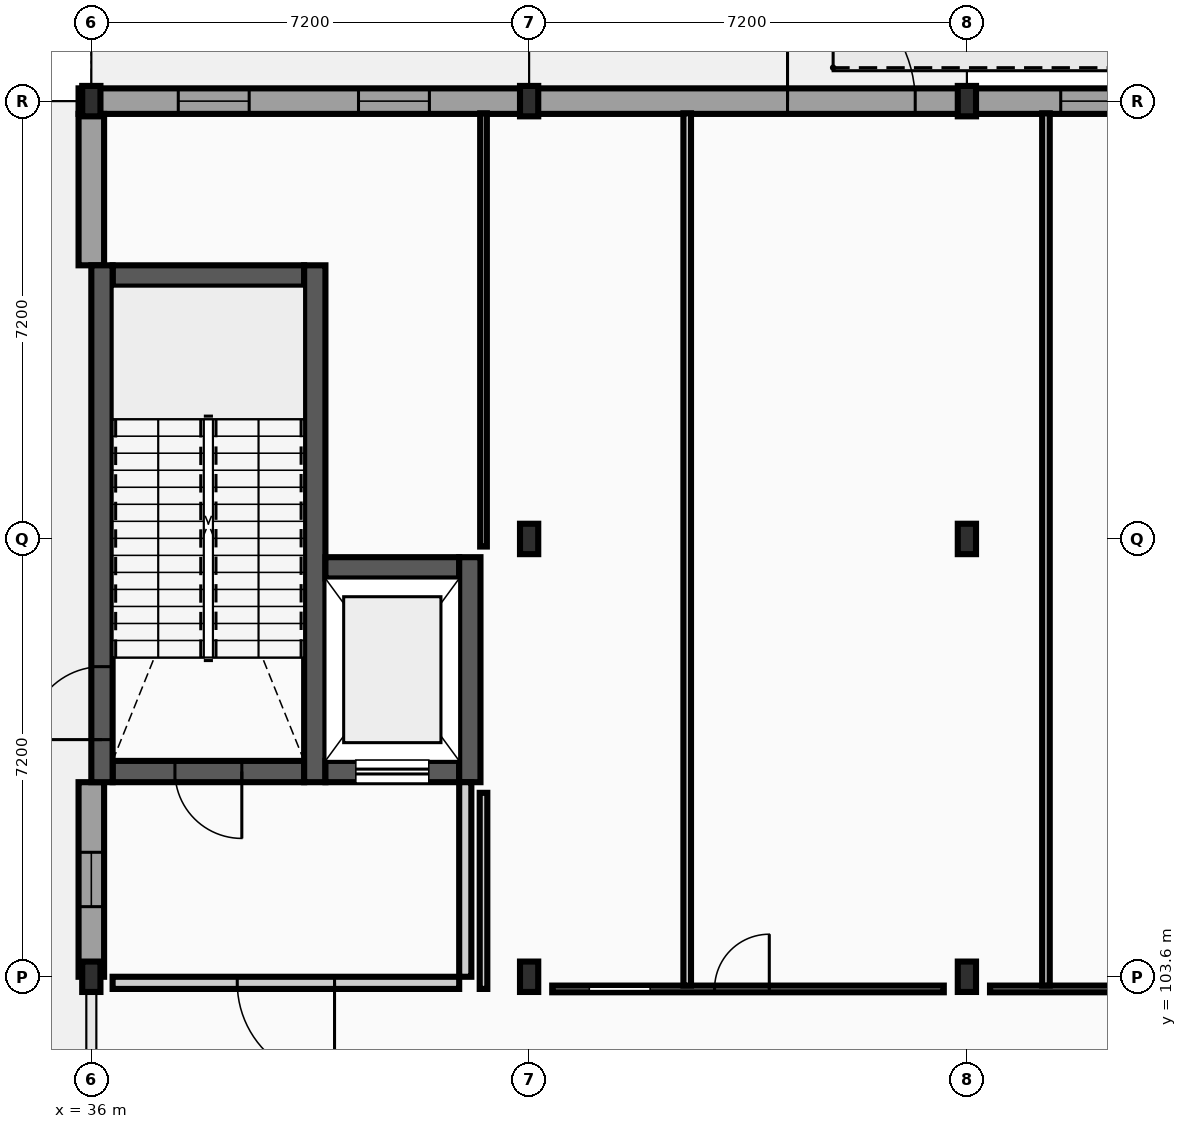
"""IFC4 building model, lengths in metres.
Left out: names, types, materials, properties, quantities, classifications, styles, units other than length and angle.
Written with IfcOpenShell. Run it as: python <this file> out.ifc"""

import sys

from ifc_helpers import new_model, si_unit, direction, frame, frame_2d, origin, origin_2d, place, context, subcontext, project, spatial, rectangle, i_section, extrude, element, fill, save


model = new_model("IFC4")
c1 = context("Model", 3, precision=1e-05, world=origin(), true_north=direction((0.0, 1.0)))
c2 = subcontext(c1, "Body", "Model", "MODEL_VIEW")
j1 = project(units=[si_unit("LENGTHUNIT", "METRE"), si_unit("PLANEANGLEUNIT", "RADIAN")], contexts=[c1])
p1 = place(None, origin())
s1 = spatial("IfcSite", under=j1, at=p1, CompositionType="ELEMENT")
p2 = place(p1, origin())
s2 = spatial("IfcBuilding", under=s1, at=p2, CompositionType="ELEMENT")
p3 = place(p2, origin())
s3 = spatial("IfcBuildingStorey", under=s2, at=p3, CompositionType="ELEMENT", Elevation=0.0)
for number, where, z_axis, x_axis in (
    (1, (36.0, 103.6, 0.0), (0.0, 0.0, 1.0), (1.0, 0.0, 0.0)),
    (2, (36.0, 118.0, 0.0), (0.0, 0.0, 1.0), (1.0, 0.0, 0.0)),
    (3, (43.2, 103.6, 0.0), (0.0, 0.0, 1.0), (1.0, 0.0, 0.0)),
    (4, (43.2, 110.8, 0.0), (0.0, 0.0, 1.0), (1.0, 0.0, 0.0)),
    (5, (43.2, 118.0, 0.0), (0.0, 0.0, 1.0), (1.0, 0.0, 0.0)),
    (6, (50.4, 103.6, 0.0), (0.0, 0.0, 1.0), (1.0, 0.0, 0.0)),
    (7, (50.4, 110.8, 0.0), (0.0, 0.0, 1.0), (1.0, 0.0, 0.0)),
    (8, (50.4, 118.0, 0.0), (0.0, 0.0, 1.0), (1.0, 0.0, 0.0)),
):
    element("IfcColumn", number, at=place(p3, frame(where, z_axis=z_axis, x_axis=x_axis)), inside=s3, PredefinedType="COLUMN", context=c2, shape_type="SweptSolid", body=[
        extrude(i_section(OverallWidth=0.3, OverallDepth=0.5, WebThickness=0.014, FlangeThickness=0.028, FilletRadius=0.027, at=origin_2d()), origin(), (0.0, 0.0, 1.0), 5.2),
    ])
p4 = place(p3, frame((43.2, 118.0, 0.0), z_axis=(0.0, 0.0, 1.0), x_axis=(-1.0, 0.0, 0.0)))
e9 = element("IfcWall", 9, at=p4, inside=s3, PredefinedType="STANDARD", context=c2, shape_type="SweptSolid", body=[
    extrude(rectangle(XDim=7.41, YDim=0.42, at=frame_2d((3.705, 0.0))), origin(), (0.0, 0.0, 1.0), 4.665),
])
p5 = place(p4, frame((1.64, 0.0, 0.95)))
e10 = element("IfcOpeningElement", 10, at=p5, cuts=e9, PredefinedType="OPENING", context=c2, shape_type="SweptSolid", body=[
    extrude(rectangle(XDim=1.166, YDim=1.332, at=frame_2d((0.583, 0.666))), frame((0.0, 0.22, 0.0), z_axis=(0.0, -1.0, 0.0), x_axis=(1.0, 0.0, 0.0)), (0.0, 0.0, 1.0), 0.44),
])
p6 = place(p4, frame((4.604, 0.0, 0.95)))
e11 = element("IfcOpeningElement", 11, at=p6, cuts=e9, PredefinedType="OPENING", context=c2, shape_type="SweptSolid", body=[
    extrude(rectangle(XDim=1.166, YDim=1.332, at=frame_2d((0.583, 0.666))), frame((0.0, 0.22, 0.0), z_axis=(0.0, -1.0, 0.0), x_axis=(1.0, 0.0, 0.0)), (0.0, 0.0, 1.0), 0.44),
])
p7 = place(p3, frame((50.4, 118.0, 0.0), z_axis=(0.0, 0.0, 1.0), x_axis=(-1.0, 0.0, 0.0)))
e12 = element("IfcWall", 12, at=p7, inside=s3, PredefinedType="STANDARD", context=c2, shape_type="SweptSolid", body=[
    extrude(rectangle(XDim=7.2, YDim=0.42, at=frame_2d((3.6, 0.0))), origin(), (0.0, 0.0, 1.0), 4.665),
])
p8 = place(p7, frame((0.85, 0.0, 0.0)))
e13 = element("IfcOpeningElement", 13, at=p8, cuts=e12, PredefinedType="OPENING", context=c2, shape_type="SweptSolid", body=[
    extrude(rectangle(XDim=2.1, YDim=2.4, at=frame_2d((1.05, 1.2))), frame((0.0, 0.22, 0.0), z_axis=(0.0, -1.0, 0.0), x_axis=(1.0, 0.0, 0.0)), (0.0, 0.0, 1.0), 0.44),
])
p9 = place(p3, frame((57.6, 118.0, 0.0), z_axis=(0.0, 0.0, 1.0), x_axis=(-1.0, 0.0, 0.0)))
e14 = element("IfcWall", 14, at=p9, inside=s3, PredefinedType="STANDARD", context=c2, shape_type="SweptSolid", body=[
    extrude(rectangle(XDim=7.2, YDim=0.42, at=frame_2d((3.6, 0.0))), origin(), (0.0, 0.0, 1.0), 4.665),
])
p10 = place(p9, frame((1.543, 0.0, 0.95)))
e15 = element("IfcOpeningElement", 15, at=p10, cuts=e14, PredefinedType="OPENING", context=c2, shape_type="SweptSolid", body=[
    extrude(rectangle(XDim=1.234, YDim=1.332, at=frame_2d((0.617, 0.666))), frame((0.0, 0.22, 0.0), z_axis=(0.0, -1.0, 0.0), x_axis=(1.0, 0.0, 0.0)), (0.0, 0.0, 1.0), 0.44),
])
p11 = place(p9, frame((4.423, 0.0, 0.95)))
e16 = element("IfcOpeningElement", 16, at=p11, cuts=e14, PredefinedType="OPENING", context=c2, shape_type="SweptSolid", body=[
    extrude(rectangle(XDim=1.234, YDim=1.332, at=frame_2d((0.617, 0.666))), frame((0.0, 0.22, 0.0), z_axis=(0.0, -1.0, 0.0), x_axis=(1.0, 0.0, 0.0)), (0.0, 0.0, 1.0), 0.44),
])
p12 = place(p3, frame((36.0, 106.8, 0.0), z_axis=(0.0, 0.0, 1.0), x_axis=(0.0, -1.0, 0.0)))
e17 = element("IfcWall", 17, at=p12, inside=s3, PredefinedType="STANDARD", context=c2, shape_type="SweptSolid", body=[
    extrude(rectangle(XDim=3.2, YDim=0.42, at=frame_2d((1.6, 0.0))), origin(), (0.0, 0.0, 1.0), 4.97),
])
p13 = place(p12, frame((1.153, 0.0, 0.95)))
e18 = element("IfcOpeningElement", 18, at=p13, cuts=e17, PredefinedType="OPENING", context=c2, shape_type="SweptSolid", body=[
    extrude(rectangle(XDim=0.894, YDim=1.368, at=frame_2d((0.447, 0.684))), frame((0.0, 0.22, 0.0), z_axis=(0.0, -1.0, 0.0), x_axis=(1.0, 0.0, 0.0)), (0.0, 0.0, 1.0), 0.44),
])
p14 = place(p3, frame((36.0, 117.79, 0.0), z_axis=(0.0, 0.0, 1.0), x_axis=(0.0, -1.0, 0.0)))
e19 = element("IfcWall", 19, at=p14, inside=s3, PredefinedType="STANDARD", context=c2, shape_type="SweptSolid", body=[
    extrude(rectangle(XDim=2.49, YDim=0.42, at=frame_2d((1.245, 0.0))), origin(), (0.0, 0.0, 1.0), 4.97),
])
p15 = place(p3, frame((36.35, 106.975, 0.0), z_axis=(0.0, 0.0, 1.0), x_axis=(1.0, 0.0, 0.0)))
e20 = element("IfcWall", 20, at=p15, inside=s3, PredefinedType="SHEAR", context=c2, shape_type="SweptSolid", body=[
    extrude(rectangle(XDim=3.15, YDim=0.35, at=frame_2d((1.575, 0.0))), origin(), (0.0, 0.0, 1.0), 4.97),
])
p16 = place(p15, frame((1.025, 0.0, 0.0)))
e21 = element("IfcOpeningElement", 21, at=p16, cuts=e20, PredefinedType="OPENING", context=c2, shape_type="SweptSolid", body=[
    extrude(rectangle(XDim=1.1, YDim=2.15, at=frame_2d((0.55, 1.075))), frame((0.0, 0.185, 0.0), z_axis=(0.0, -1.0, 0.0), x_axis=(1.0, 0.0, 0.0)), (0.0, 0.0, 1.0), 0.37),
])
p17 = place(p3, frame((36.35, 115.125, 0.0), z_axis=(0.0, 0.0, 1.0), x_axis=(1.0, 0.0, 0.0)))
e22 = element("IfcWall", 22, at=p17, inside=s3, PredefinedType="SHEAR", context=c2, shape_type="SweptSolid", body=[
    extrude(rectangle(XDim=3.15, YDim=0.35, at=frame_2d((1.575, 0.0))), origin(), (0.0, 0.0, 1.0), 4.97),
])
p18 = place(p3, frame((36.175, 106.8, 0.0), z_axis=(0.0, 0.0, 1.0), x_axis=(0.0, 1.0, 0.0)))
e23 = element("IfcWall", 23, at=p18, inside=s3, PredefinedType="SHEAR", context=c2, shape_type="SweptSolid", body=[
    extrude(rectangle(XDim=8.5, YDim=0.35, at=frame_2d((4.25, 0.0))), origin(), (0.0, 0.0, 1.0), 4.97),
])
p19 = place(p18, frame((0.7, 0.0, 0.0)))
e24 = element("IfcOpeningElement", 24, at=p19, cuts=e23, PredefinedType="OPENING", context=c2, shape_type="SweptSolid", body=[
    extrude(rectangle(XDim=1.2, YDim=2.15, at=frame_2d((0.6, 1.075))), frame((0.0, 0.185, 0.0), z_axis=(0.0, -1.0, 0.0), x_axis=(1.0, 0.0, 0.0)), (0.0, 0.0, 1.0), 0.37),
])
p20 = place(p3, frame((39.675, 106.8, 0.0), z_axis=(0.0, 0.0, 1.0), x_axis=(0.0, 1.0, 0.0)))
e25 = element("IfcWall", 25, at=p20, inside=s3, PredefinedType="SHEAR", context=c2, shape_type="SweptSolid", body=[
    extrude(rectangle(XDim=8.5, YDim=0.35, at=frame_2d((4.25, 0.0))), origin(), (0.0, 0.0, 1.0), 4.97),
])
p21 = place(p3, frame((39.85, 106.975, 0.0), z_axis=(0.0, 0.0, 1.0), x_axis=(1.0, 0.0, 0.0)))
e26 = element("IfcWall", 26, at=p21, inside=s3, PredefinedType="SHEAR", context=c2, shape_type="SweptSolid", body=[
    extrude(rectangle(XDim=2.2, YDim=0.35, at=frame_2d((1.1, 0.0))), origin(), (0.0, 0.0, 1.0), 4.97),
])
p22 = place(p21, frame((0.5, 0.0, 0.0)))
e27 = element("IfcOpeningElement", 27, at=p22, cuts=e26, PredefinedType="OPENING", context=c2, shape_type="SweptSolid", body=[
    extrude(rectangle(XDim=1.2, YDim=2.2, at=frame_2d((0.6, 1.1))), frame((0.0, 0.185, 0.0), z_axis=(0.0, -1.0, 0.0), x_axis=(1.0, 0.0, 0.0)), (0.0, 0.0, 1.0), 0.37),
])
p23 = place(p3, frame((39.85, 110.325, 0.0), z_axis=(0.0, 0.0, 1.0), x_axis=(1.0, 0.0, 0.0)))
e28 = element("IfcWall", 28, at=p23, inside=s3, PredefinedType="SHEAR", context=c2, shape_type="SweptSolid", body=[
    extrude(rectangle(XDim=2.2, YDim=0.35, at=frame_2d((1.1, 0.0))), origin(), (0.0, 0.0, 1.0), 4.97),
])
p24 = place(p3, frame((42.225, 106.8, 0.0), z_axis=(0.0, 0.0, 1.0), x_axis=(0.0, 1.0, 0.0)))
e29 = element("IfcWall", 29, at=p24, inside=s3, PredefinedType="SHEAR", context=c2, shape_type="SweptSolid", body=[
    extrude(rectangle(XDim=3.7, YDim=0.35, at=frame_2d((1.85, 0.0))), origin(), (0.0, 0.0, 1.0), 4.97),
])
p25 = place(p3, frame((36.35, 103.5, 0.0), z_axis=(0.0, 0.0, 1.0), x_axis=(1.0, 0.0, 0.0)))
e30 = element("IfcWall", 30, at=p25, inside=s3, PredefinedType="PARTITIONING", context=c2, shape_type="SweptSolid", body=[
    extrude(rectangle(XDim=5.7, YDim=0.2, at=frame_2d((2.85, 0.0))), origin(), (0.0, 0.0, 1.0), 4.665),
])
p26 = place(p25, frame((2.05, 0.0, 0.0)))
e31 = element("IfcOpeningElement", 31, at=p26, cuts=e30, PredefinedType="OPENING", context=c2, shape_type="SweptSolid", body=[
    extrude(rectangle(XDim=1.6, YDim=2.2, at=frame_2d((0.8, 1.1))), frame((0.0, 0.11, 0.0), z_axis=(0.0, -1.0, 0.0), x_axis=(1.0, 0.0, 0.0)), (0.0, 0.0, 1.0), 0.22),
])
p27 = place(p3, frame((42.15, 103.6, 0.0), z_axis=(0.0, 0.0, 1.0), x_axis=(0.0, 1.0, 0.0)))
e32 = element("IfcWall", 32, at=p27, inside=s3, PredefinedType="PARTITIONING", context=c2, shape_type="SweptSolid", body=[
    extrude(rectangle(XDim=3.2, YDim=0.2, at=frame_2d((1.6, 0.0))), origin(), (0.0, 0.0, 1.0), 4.97),
])
p28 = place(p3, frame((43.58, 103.4, 0.0), z_axis=(0.0, 0.0, 1.0), x_axis=(1.0, 0.0, 0.0)))
e33 = element("IfcWall", 33, at=p28, inside=s3, PredefinedType="PARTITIONING", context=c2, shape_type="SweptSolid", body=[
    extrude(rectangle(XDim=6.44, YDim=0.11, at=frame_2d((3.22, 0.0))), origin(), (0.0, 0.0, 1.0), 4.665),
])
p29 = place(p28, frame((0.61, 0.0, 0.0)))
e34 = element("IfcOpeningElement", 34, at=p29, cuts=e33, PredefinedType="OPENING", context=c2, shape_type="SweptSolid", body=[
    extrude(rectangle(XDim=1.0, YDim=2.1, at=frame_2d((0.5, 1.05))), frame((0.0, 0.065, 0.0), z_axis=(0.0, -1.0, 0.0), x_axis=(1.0, 0.0, 0.0)), (0.0, 0.0, 1.0), 0.13),
])
p30 = place(p28, frame((2.67, 0.0, 0.0)))
e35 = element("IfcOpeningElement", 35, at=p30, cuts=e33, PredefinedType="OPENING", context=c2, shape_type="SweptSolid", body=[
    extrude(rectangle(XDim=0.9, YDim=2.1, at=frame_2d((0.45, 1.05))), frame((0.0, 0.065, 0.0), z_axis=(0.0, -1.0, 0.0), x_axis=(1.0, 0.0, 0.0)), (0.0, 0.0, 1.0), 0.13),
])
p31 = place(p3, frame((50.78, 103.4, 0.0), z_axis=(0.0, 0.0, 1.0), x_axis=(1.0, 0.0, 0.0)))
e36 = element("IfcWall", 36, at=p31, inside=s3, PredefinedType="PARTITIONING", context=c2, shape_type="SweptSolid", body=[
    extrude(rectangle(XDim=6.44, YDim=0.11, at=frame_2d((3.22, 0.0))), origin(), (0.0, 0.0, 1.0), 4.665),
])
p32 = place(p31, frame((3.123, 0.0, 0.0)))
e37 = element("IfcOpeningElement", 37, at=p32, cuts=e36, PredefinedType="OPENING", context=c2, shape_type="SweptSolid", body=[
    extrude(rectangle(XDim=1.114, YDim=2.096, at=frame_2d((0.557, 1.048))), frame((0.0, 0.065, 0.0), z_axis=(0.0, -1.0, 0.0), x_axis=(1.0, 0.0, 0.0)), (0.0, 0.0, 1.0), 0.13),
])
p33 = place(p3, frame((42.45, 103.4, 0.0), z_axis=(0.0, 0.0, 1.0), x_axis=(0.0, 1.0, 0.0)))
e38 = element("IfcWall", 38, at=p33, inside=s3, PredefinedType="PARTITIONING", context=c2, shape_type="SweptSolid", body=[
    extrude(rectangle(XDim=3.225, YDim=0.125, at=frame_2d((1.613, 0.0))), origin(), (0.0, 0.0, 1.0), 4.97),
])
p34 = place(p3, frame((42.45, 110.675, 0.0), z_axis=(0.0, 0.0, 1.0), x_axis=(0.0, 1.0, 0.0)))
e39 = element("IfcWall", 39, at=p34, inside=s3, PredefinedType="PARTITIONING", context=c2, shape_type="SweptSolid", body=[
    extrude(rectangle(XDim=7.125, YDim=0.11, at=frame_2d((3.562, 0.0))), origin(), (0.0, 0.0, 1.0), 4.97),
])
p35 = place(p3, frame((45.8, 103.455, 0.0), z_axis=(0.0, 0.0, 1.0), x_axis=(0.0, 1.0, 0.0)))
e40 = element("IfcWall", 40, at=p35, inside=s3, PredefinedType="PARTITIONING", context=c2, shape_type="SweptSolid", body=[
    extrude(rectangle(XDim=14.345, YDim=0.125, at=frame_2d((7.172, 0.0))), origin(), (0.0, 0.0, 1.0), 4.655),
])
p36 = place(p3, frame((51.7, 103.455, 0.0), z_axis=(0.0, 0.0, 1.0), x_axis=(0.0, 1.0, 0.0)))
e41 = element("IfcWall", 41, at=p36, inside=s3, PredefinedType="PARTITIONING", context=c2, shape_type="SweptSolid", body=[
    extrude(rectangle(XDim=14.345, YDim=0.125, at=frame_2d((7.172, 0.0))), origin(), (0.0, 0.0, 1.0), 4.97),
])
p37 = place(p5, origin())
e42 = element("IfcWindow", 42, at=p37, inside=s3, PartitioningType="SINGLE_PANEL", PredefinedType="WINDOW", context=c2, shape_type="SweptSolid", body=[
    extrude(rectangle(XDim=1.166, YDim=1.332, at=frame_2d((0.583, 0.666))), frame((0.0, 0.03, 0.0), z_axis=(0.0, -1.0, 0.0), x_axis=(1.0, 0.0, 0.0)), (0.0, 0.0, 1.0), 0.06),
])
fill(e10, e42)
p38 = place(p6, origin())
e43 = element("IfcWindow", 43, at=p38, inside=s3, PartitioningType="SINGLE_PANEL", PredefinedType="WINDOW", context=c2, shape_type="SweptSolid", body=[
    extrude(rectangle(XDim=1.166, YDim=1.332, at=frame_2d((0.583, 0.666))), frame((0.0, 0.03, 0.0), z_axis=(0.0, -1.0, 0.0), x_axis=(1.0, 0.0, 0.0)), (0.0, 0.0, 1.0), 0.06),
])
fill(e11, e43)
p39 = place(p11, origin())
e44 = element("IfcWindow", 44, at=p39, inside=s3, PartitioningType="SINGLE_PANEL", PredefinedType="WINDOW", context=c2, shape_type="SweptSolid", body=[
    extrude(rectangle(XDim=1.234, YDim=1.332, at=frame_2d((0.617, 0.666))), frame((0.0, 0.03, 0.0), z_axis=(0.0, -1.0, 0.0), x_axis=(1.0, 0.0, 0.0)), (0.0, 0.0, 1.0), 0.06),
])
fill(e16, e44)
p40 = place(p13, origin())
e45 = element("IfcWindow", 45, at=p40, inside=s3, PartitioningType="SINGLE_PANEL", PredefinedType="WINDOW", context=c2, shape_type="SweptSolid", body=[
    extrude(rectangle(XDim=0.894, YDim=1.368, at=frame_2d((0.447, 0.684))), frame((0.0, 0.03, 0.0), z_axis=(0.0, -1.0, 0.0), x_axis=(1.0, 0.0, 0.0)), (0.0, 0.0, 1.0), 0.06),
])
fill(e18, e45)
p41 = place(p8, origin())
e46 = element("IfcDoor", 46, at=p41, inside=s3, OperationType="DOUBLE_DOOR_SINGLE_SWING", PredefinedType="DOOR", context=c2, shape_type="SweptSolid", body=[
    extrude(rectangle(XDim=2.1, YDim=2.4, at=frame_2d((1.05, 1.2))), frame((0.0, 0.025, 0.0), z_axis=(0.0, -1.0, 0.0), x_axis=(1.0, 0.0, 0.0)), (0.0, 0.0, 1.0), 0.05),
])
fill(e13, e46)
p42 = place(p16, origin())
e47 = element("IfcDoor", 47, at=p42, inside=s3, OperationType="SINGLE_SWING_RIGHT", PredefinedType="DOOR", context=c2, shape_type="SweptSolid", body=[
    extrude(rectangle(XDim=1.1, YDim=2.15, at=frame_2d((0.55, 1.075))), frame((0.0, 0.025, 0.0), z_axis=(0.0, -1.0, 0.0), x_axis=(1.0, 0.0, 0.0)), (0.0, 0.0, 1.0), 0.05),
])
fill(e21, e47)
p43 = place(p19, origin())
e48 = element("IfcDoor", 48, at=p43, inside=s3, OperationType="SINGLE_SWING_LEFT", PredefinedType="DOOR", context=c2, shape_type="SweptSolid", body=[
    extrude(rectangle(XDim=1.2, YDim=2.15, at=frame_2d((0.6, 1.075))), frame((0.0, 0.025, 0.0), z_axis=(0.0, -1.0, 0.0), x_axis=(1.0, 0.0, 0.0)), (0.0, 0.0, 1.0), 0.05),
])
fill(e24, e48)
p44 = place(p22, origin())
e49 = element("IfcDoor", 49, at=p44, inside=s3, OperationType="SLIDING_TO_RIGHT", PredefinedType="DOOR", context=c2, shape_type="SweptSolid", body=[
    extrude(rectangle(XDim=1.2, YDim=2.2, at=frame_2d((0.6, 1.1))), frame((0.0, 0.025, 0.0), z_axis=(0.0, -1.0, 0.0), x_axis=(1.0, 0.0, 0.0)), (0.0, 0.0, 1.0), 0.05),
])
fill(e27, e49)
p45 = place(p26, origin())
e50 = element("IfcDoor", 50, at=p45, inside=s3, OperationType="DOUBLE_DOOR_SINGLE_SWING", PredefinedType="DOOR", context=c2, shape_type="SweptSolid", body=[
    extrude(rectangle(XDim=1.6, YDim=2.2, at=frame_2d((0.8, 1.1))), frame((0.0, 0.025, 0.0), z_axis=(0.0, -1.0, 0.0), x_axis=(1.0, 0.0, 0.0)), (0.0, 0.0, 1.0), 0.05),
])
fill(e31, e50)
p46 = place(p29, frame((1.0, 0.0, 0.0), z_axis=(0.0, 0.0, 1.0), x_axis=(-1.0, 0.0, 0.0)))
e51 = element("IfcDoor", 51, at=p46, inside=s3, OperationType="SLIDING_TO_LEFT", PredefinedType="DOOR", context=c2, shape_type="SweptSolid", body=[
    extrude(rectangle(XDim=1.0, YDim=2.1, at=frame_2d((0.5, 1.05))), frame((0.0, 0.025, 0.0), z_axis=(0.0, -1.0, 0.0), x_axis=(1.0, 0.0, 0.0)), (0.0, 0.0, 1.0), 0.05),
])
fill(e34, e51)
p47 = place(p30, frame((0.9, 0.0, 0.0), z_axis=(0.0, 0.0, 1.0), x_axis=(-1.0, 0.0, 0.0)))
e52 = element("IfcDoor", 52, at=p47, inside=s3, OperationType="SINGLE_SWING_RIGHT", PredefinedType="DOOR", context=c2, shape_type="SweptSolid", body=[
    extrude(rectangle(XDim=0.9, YDim=2.1, at=frame_2d((0.45, 1.05))), frame((0.0, 0.025, 0.0), z_axis=(0.0, -1.0, 0.0), x_axis=(1.0, 0.0, 0.0)), (0.0, 0.0, 1.0), 0.05),
])
fill(e35, e52)
save(model, sys.argv[1])
